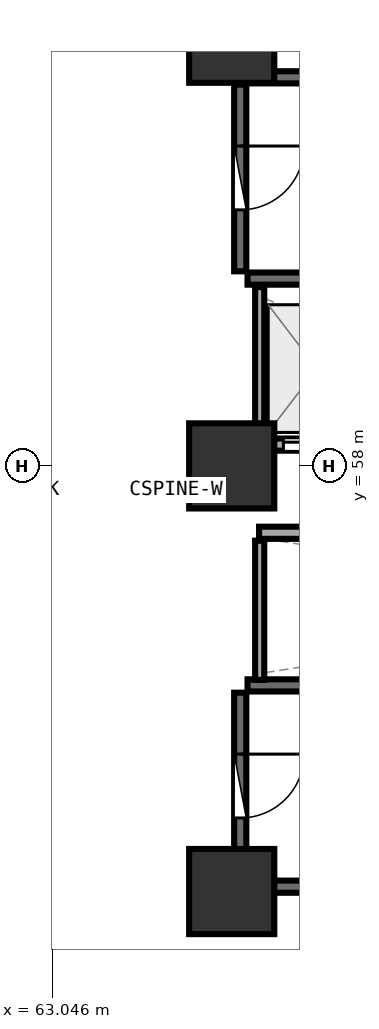
"""IFC4 building model, lengths in metres.
Left out: names, types, materials, properties, quantities, classifications, styles, units other than length and angle.
Written with IfcOpenShell. Run it as: python <this file> out.ifc"""

import sys

from ifc_helpers import new_model, si_unit, direction, frame, frame_2d, origin, origin_2d, place, context, subcontext, project, spatial, rectangle, extrude, element, fill, save


model = new_model("IFC4")
c1 = context("Model", 3, precision=1e-05, world=origin(), true_north=direction((0.0, 1.0)))
c2 = subcontext(c1, "Body", "Model", "MODEL_VIEW")
j1 = project(units=[si_unit("LENGTHUNIT", "METRE"), si_unit("PLANEANGLEUNIT", "RADIAN")], contexts=[c1])
p1 = place(None, origin())
s1 = spatial("IfcSite", under=j1, at=p1, CompositionType="ELEMENT")
p2 = place(p1, origin())
s2 = spatial("IfcBuilding", under=s1, at=p2, CompositionType="ELEMENT")
p3 = place(p2, frame((0.0, 0.0, 48.75)))
s3 = spatial("IfcBuildingStorey", under=s2, at=p3, CompositionType="ELEMENT", Elevation=48.75)
for number, where, z_axis, x_axis in (
    (1, (66.0, 51.0, 0.0), (0.0, 0.0, 1.0), (1.0, 0.0, 0.0)),
    (2, (66.0, 65.0, 0.0), (0.0, 0.0, 1.0), (1.0, 0.0, 0.0)),
    (3, (66.0, 58.0, 0.0), (0.0, 0.0, 1.0), (1.0, 0.0, 0.0)),
):
    element("IfcColumn", number, at=place(p3, frame(where, z_axis=z_axis, x_axis=x_axis)), inside=s3, PredefinedType="PILASTER", context=c2, shape_type="SweptSolid", body=[
        extrude(rectangle(XDim=1.4, YDim=1.4, at=origin_2d()), origin(), (0.0, 0.0, 1.0), 3.75),
    ])
for number, where, z_axis, x_axis in (
    (4, (66.26, 61.08, 0.0), (0.0, 0.0, 1.0), (1.0, 0.0, 0.0)),
    (5, (73.42, 64.39, 0.0), (0.0, 0.0, 1.0), (-1.0, 0.0, 0.0)),
):
    element("IfcWall", number, at=place(p3, frame(where, z_axis=z_axis, x_axis=x_axis)), inside=s3, PredefinedType="SHEAR", context=c2, shape_type="SweptSolid", body=[
        extrude(rectangle(XDim=7.16, YDim=0.2, at=frame_2d((3.58, 0.0))), origin(), (0.0, 0.0, 1.0), 3.49),
    ])
p4 = place(p3, frame((66.14, 64.27, 0.0), z_axis=(0.0, 0.0, 1.0), x_axis=(0.0, -1.0, 0.0)))
e6 = element("IfcWall", 6, at=p4, inside=s3, PredefinedType="SHEAR", context=c2, shape_type="SweptSolid", body=[
    extrude(rectangle(XDim=3.07, YDim=0.2, at=frame_2d((1.535, 0.0))), origin(), (0.0, 0.0, 1.0), 3.49),
])
p5 = place(p4, frame((1.01, 0.0, 0.0)))
e7 = element("IfcOpeningElement", 7, at=p5, cuts=e6, PredefinedType="OPENING", context=c2, shape_type="SweptSolid", body=[
    extrude(rectangle(XDim=1.05, YDim=2.1, at=frame_2d((0.525, 1.05))), frame((0.0, 0.11, 0.0), z_axis=(0.0, -1.0, 0.0), x_axis=(1.0, 0.0, 0.0)), (0.0, 0.0, 1.0), 0.22),
])
for number, where, z_axis, x_axis in (
    (8, (66.26, 51.08, 0.0), (0.0, 0.0, 1.0), (1.0, 0.0, 0.0)),
    (9, (73.42, 54.39, 0.0), (0.0, 0.0, 1.0), (-1.0, 0.0, 0.0)),
):
    element("IfcWall", number, at=place(p3, frame(where, z_axis=z_axis, x_axis=x_axis)), inside=s3, PredefinedType="SHEAR", context=c2, shape_type="SweptSolid", body=[
        extrude(rectangle(XDim=7.16, YDim=0.2, at=frame_2d((3.58, 0.0))), origin(), (0.0, 0.0, 1.0), 3.49),
    ])
p6 = place(p3, frame((66.14, 54.27, 0.0), z_axis=(0.0, 0.0, 1.0), x_axis=(0.0, -1.0, 0.0)))
e10 = element("IfcWall", 10, at=p6, inside=s3, PredefinedType="SHEAR", context=c2, shape_type="SweptSolid", body=[
    extrude(rectangle(XDim=3.07, YDim=0.2, at=frame_2d((1.535, 0.0))), origin(), (0.0, 0.0, 1.0), 3.49),
])
p7 = place(p6, frame((1.01, 0.0, 0.0)))
e11 = element("IfcOpeningElement", 11, at=p7, cuts=e10, PredefinedType="OPENING", context=c2, shape_type="SweptSolid", body=[
    extrude(rectangle(XDim=1.05, YDim=2.1, at=frame_2d((0.525, 1.05))), frame((0.0, 0.11, 0.0), z_axis=(0.0, -1.0, 0.0), x_axis=(1.0, 0.0, 0.0)), (0.0, 0.0, 1.0), 0.22),
])
p8 = place(p3, frame((66.45, 58.35, 0.0), z_axis=(0.0, 0.0, 1.0), x_axis=(1.0, 0.0, 0.0)))
e12 = element("IfcWall", 12, at=p8, inside=s3, PredefinedType="SOLIDWALL", context=c2, shape_type="SweptSolid", body=[
    extrude(rectangle(XDim=6.0, YDim=0.2, at=frame_2d((3.0, 0.0))), origin(), (0.0, 0.0, 1.0), 3.48),
])
p9 = place(p8, frame((0.4, 0.0, 0.0)))
e13 = element("IfcOpeningElement", 13, at=p9, cuts=e12, PredefinedType="OPENING", context=c2, shape_type="SweptSolid", body=[
    extrude(rectangle(XDim=1.1, YDim=2.1, at=frame_2d((0.55, 1.05))), frame((0.0, 0.11, 0.0), z_axis=(0.0, -1.0, 0.0), x_axis=(1.0, 0.0, 0.0)), (0.0, 0.0, 1.0), 0.22),
])
p10 = place(p8, frame((2.4, 0.0, 0.0)))
e14 = element("IfcOpeningElement", 14, at=p10, cuts=e12, PredefinedType="OPENING", context=c2, shape_type="SweptSolid", body=[
    extrude(rectangle(XDim=1.1, YDim=2.1, at=frame_2d((0.55, 1.05))), frame((0.0, 0.11, 0.0), z_axis=(0.0, -1.0, 0.0), x_axis=(1.0, 0.0, 0.0)), (0.0, 0.0, 1.0), 0.22),
])
p11 = place(p8, frame((4.4, 0.0, 0.0)))
e15 = element("IfcOpeningElement", 15, at=p11, cuts=e12, PredefinedType="OPENING", context=c2, shape_type="SweptSolid", body=[
    extrude(rectangle(XDim=1.1, YDim=2.1, at=frame_2d((0.55, 1.05))), frame((0.0, 0.11, 0.0), z_axis=(0.0, -1.0, 0.0), x_axis=(1.0, 0.0, 0.0)), (0.0, 0.0, 1.0), 0.22),
])
p12 = place(p3, frame((66.46, 58.48, 0.0), z_axis=(0.0, 0.0, 1.0), x_axis=(0.0, 1.0, 0.0)))
e16 = element("IfcWall", 16, at=p12, inside=s3, PredefinedType="PARTITIONING", context=c2, shape_type="SweptSolid", body=[
    extrude(rectangle(XDim=2.46, YDim=0.15, at=frame_2d((1.23, 0.0))), origin(), (0.0, 0.0, 1.0), 3.48),
])
p13 = place(p3, frame((66.45, 56.9, 0.0), z_axis=(0.0, 0.0, 1.0), x_axis=(1.0, 0.0, 0.0)))
e17 = element("IfcWall", 17, at=p13, inside=s3, PredefinedType="SOLIDWALL", context=c2, shape_type="SweptSolid", body=[
    extrude(rectangle(XDim=14.4, YDim=0.2, at=frame_2d((7.2, 0.0))), origin(), (0.0, 0.0, 1.0), 3.48),
])
p14 = place(p3, frame((66.46, 54.48, 0.0), z_axis=(0.0, 0.0, 1.0), x_axis=(0.0, 1.0, 0.0)))
e18 = element("IfcWall", 18, at=p14, inside=s3, PredefinedType="PARTITIONING", context=c2, shape_type="SweptSolid", body=[
    extrude(rectangle(XDim=2.29, YDim=0.15, at=frame_2d((1.145, 0.0))), origin(), (0.0, 0.0, 1.0), 3.48),
])
p15 = place(p3, frame((61.499, 50.454, 0.0), z_axis=(0.0, 0.0, 1.0), x_axis=(0.747393415848, -0.664381729089, 0.0)))
e19 = element("IfcWall", 19, at=p15, inside=s3, PredefinedType="PARTITIONING", context=c2, shape_type="SweptSolid", body=[
    extrude(rectangle(XDim=5.929, YDim=0.12, at=frame_2d((2.965, 0.0))), origin(), (0.0, 0.0, 1.0), 2.875),
])
p16 = place(p15, frame((2.515, 0.0, 0.0)))
e20 = element("IfcOpeningElement", 20, at=p16, cuts=e19, PredefinedType="OPENING", context=c2, shape_type="SweptSolid", body=[
    extrude(rectangle(XDim=0.9, YDim=2.08, at=frame_2d((0.45, 1.04))), frame((0.0, 0.07, 0.0), z_axis=(0.0, -1.0, 0.0), x_axis=(1.0, 0.0, 0.0)), (0.0, 0.0, 1.0), 0.14),
])
p17 = place(p5, origin())
e21 = element("IfcDoor", 21, at=p17, inside=s3, OperationType="SINGLE_SWING_LEFT", PredefinedType="DOOR", context=c2, shape_type="SweptSolid", body=[
    extrude(rectangle(XDim=1.05, YDim=2.1, at=frame_2d((0.525, 1.05))), frame((0.0, 0.025, 0.0), z_axis=(0.0, -1.0, 0.0), x_axis=(1.0, 0.0, 0.0)), (0.0, 0.0, 1.0), 0.05),
])
fill(e7, e21)
p18 = place(p7, origin())
e22 = element("IfcDoor", 22, at=p18, inside=s3, OperationType="SINGLE_SWING_LEFT", PredefinedType="DOOR", context=c2, shape_type="SweptSolid", body=[
    extrude(rectangle(XDim=1.05, YDim=2.1, at=frame_2d((0.525, 1.05))), frame((0.0, 0.025, 0.0), z_axis=(0.0, -1.0, 0.0), x_axis=(1.0, 0.0, 0.0)), (0.0, 0.0, 1.0), 0.05),
])
fill(e11, e22)
p19 = place(p9, origin())
e23 = element("IfcDoor", 23, at=p19, inside=s3, OperationType="DOUBLE_DOOR_SLIDING", PredefinedType="DOOR", context=c2, shape_type="SweptSolid", body=[
    extrude(rectangle(XDim=1.1, YDim=2.1, at=frame_2d((0.55, 1.05))), frame((0.0, 0.025, 0.0), z_axis=(0.0, -1.0, 0.0), x_axis=(1.0, 0.0, 0.0)), (0.0, 0.0, 1.0), 0.05),
])
fill(e13, e23)
save(model, sys.argv[1])
